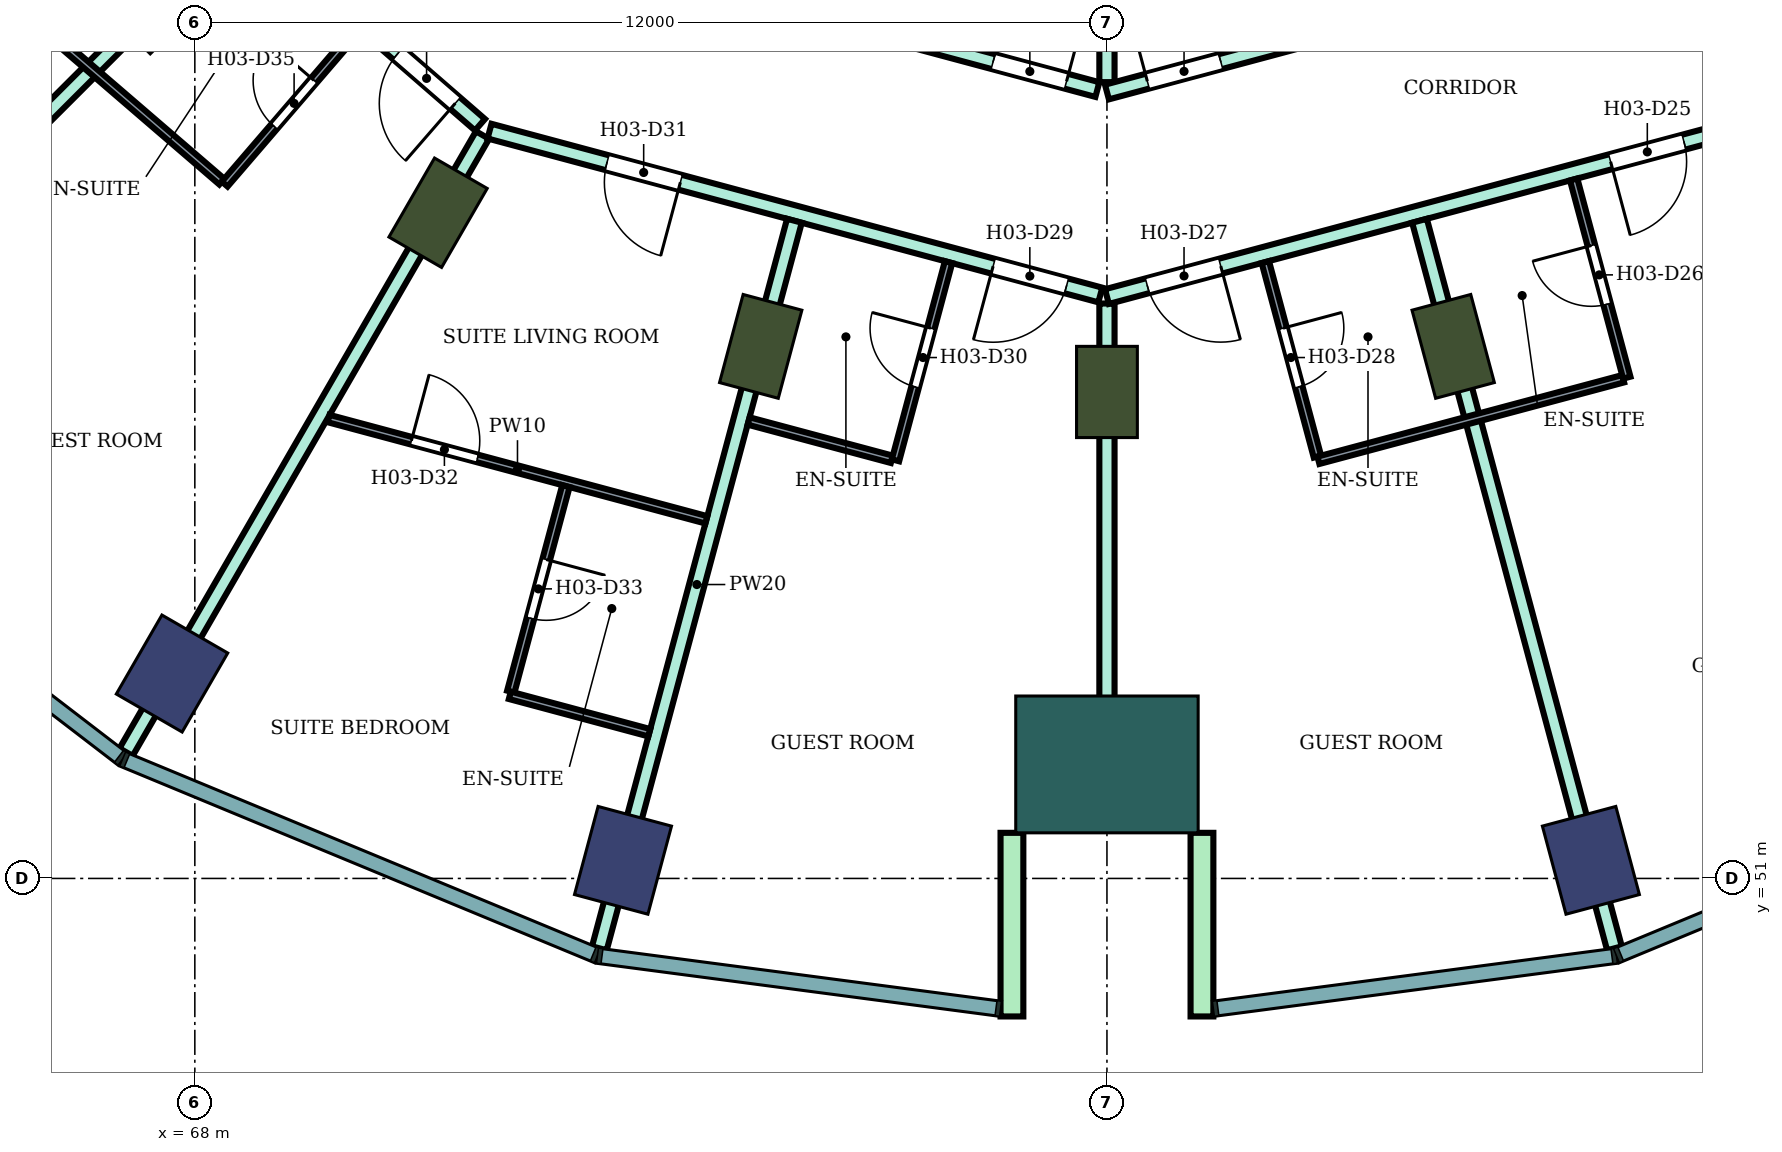
"""IFC4 building model, lengths in metres.
Left out: names, types, materials, properties, quantities, classifications, styles, units other than length and angle.
Written with IfcOpenShell. Run it as: python <this file> out.ifc"""

import sys

from ifc_helpers import new_model, si_unit, direction, frame, frame_2d, origin, origin_2d, place, context, subcontext, project, spatial, rectangle, extrude, element, fill, save


model = new_model("IFC4")
c1 = context("Model", 3, precision=1e-05, world=origin(), true_north=direction((0.0, 1.0)))
c2 = subcontext(c1, "Body", "Model", "MODEL_VIEW")
j1 = project(units=[si_unit("LENGTHUNIT", "METRE"), si_unit("PLANEANGLEUNIT", "RADIAN")], contexts=[c1])
p1 = place(None, origin())
s1 = spatial("IfcSite", under=j1, at=p1, CompositionType="ELEMENT")
p2 = place(p1, origin())
s2 = spatial("IfcBuilding", under=s1, at=p2, CompositionType="ELEMENT")
p3 = place(p2, frame((0.0, 0.0, 51.6)))
s3 = spatial("IfcBuildingStorey", under=s2, at=p3, CompositionType="ELEMENT", Elevation=51.6)
for number, where, z_axis, x_axis in (
    (1, (67.7, 53.696, 0.0), (0.0, 0.0, 1.0), (-0.5, -0.866, 0.0)),
    (2, (73.633, 51.238, 0.0), (0.0, 0.0, 1.0), (-0.259, -0.966, 0.0)),
    (3, (86.367, 51.238, 0.0), (0.0, 0.0, 1.0), (0.259, -0.966, 0.0)),
):
    element("IfcColumn", number, at=place(p3, frame(where, z_axis=z_axis, x_axis=x_axis)), inside=s3, PredefinedType="COLUMN", context=c2, shape_type="SweptSolid", body=[
        extrude(rectangle(XDim=1.2, YDim=1.0, at=origin_2d()), origin(), (0.0, 0.0, 1.0), 3.8),
    ])
for number, where, z_axis, x_axis in (
    (4, (67.555, 62.555, 0.0), (0.0, 0.0, 1.0), (-0.707, -0.707, 0.0)),
    (5, (71.2, 59.758, 0.0), (0.0, 0.0, 1.0), (-0.5, -0.866, 0.0)),
    (6, (75.445, 58.0, 0.0), (0.0, 0.0, 1.0), (-0.259, -0.966, 0.0)),
    (7, (80.0, 57.4, 0.0), (0.0, 0.0, 1.0), (0.0, -1.0, 0.0)),
    (8, (84.555, 58.0, 0.0), (0.0, 0.0, 1.0), (0.259, -0.966, 0.0)),
):
    element("IfcColumn", number, at=place(p3, frame(where, z_axis=z_axis, x_axis=x_axis)), inside=s3, PredefinedType="COLUMN", context=c2, shape_type="SweptSolid", body=[
        extrude(rectangle(XDim=1.2, YDim=0.8, at=origin_2d()), origin(), (0.0, 0.0, 1.0), 3.8),
    ])
p4 = place(p3, frame((80.0, 52.5, 0.0), z_axis=(0.0, 0.0, 1.0), x_axis=(0.0, -1.0, 0.0)))
e9 = element("IfcColumn", 9, at=p4, inside=s3, PredefinedType="COLUMN", context=c2, shape_type="SweptSolid", body=[
    extrude(rectangle(XDim=1.8, YDim=2.4, at=origin_2d()), origin(), (0.0, 0.0, 1.0), 3.8),
])
for number, where, z_axis, x_axis in (
    (10, (78.75, 51.6, 0.0), (0.0, 0.0, 1.0), (0.0, -1.0, 0.0)),
    (11, (81.25, 51.6, 0.0), (0.0, 0.0, 1.0), (0.0, -1.0, 0.0)),
):
    element("IfcWall", number, at=place(p3, frame(where, z_axis=z_axis, x_axis=x_axis)), inside=s3, PredefinedType="NOTDEFINED", context=c2, shape_type="SweptSolid", body=[
        extrude(rectangle(XDim=2.416, YDim=0.3, at=frame_2d((1.208, 0.0))), origin(), (0.0, 0.0, 1.0), 3.8),
    ])
p5 = place(p3, frame((63.596, 58.596, 0.0), z_axis=(0.0, 0.0, 1.0), x_axis=(0.707106781187, 0.707106781187, 0.0)))
e12 = element("IfcWall", 12, at=p5, inside=s3, PredefinedType="PARTITIONING", context=c2, shape_type="SweptSolid", body=[
    extrude(rectangle(XDim=7.005, YDim=0.2, at=frame_2d((3.503, 0.0))), origin(), (0.0, 0.0, 1.0), 3.35),
])
p6 = place(p3, frame((67.081, 64.971, 0.0), z_axis=(0.0, 0.0, 1.0), x_axis=(0.755031061605, -0.65568902386, 0.0)))
e13 = element("IfcWall", 13, at=p6, inside=s3, PredefinedType="PARTITIONING", context=c2, shape_type="SweptSolid", body=[
    extrude(rectangle(XDim=6.186, YDim=0.2, at=frame_2d((3.093, 0.0))), origin(), (0.0, 0.0, 1.0), 3.35),
])
p7 = place(p6, frame((4.755, 0.0, 0.0)))
e14 = element("IfcOpeningElement", 14, at=p7, cuts=e13, PredefinedType="OPENING", context=c2, shape_type="SweptSolid", body=[
    extrude(rectangle(XDim=1.0, YDim=2.1, at=frame_2d((0.5, 1.05))), frame((0.0, 0.11, 0.0), z_axis=(0.0, -1.0, 0.0), x_axis=(1.0, 0.0, 0.0)), (0.0, 0.0, 1.0), 0.22),
])
p8 = place(p3, frame((67.095, 52.662, 0.0), z_axis=(0.0, 0.0, 1.0), x_axis=(0.500247659952, 0.865882370021, 0.0)))
e15 = element("IfcWall", 15, at=p8, inside=s3, PredefinedType="PARTITIONING", context=c2, shape_type="SweptSolid", body=[
    extrude(rectangle(XDim=9.375, YDim=0.2, at=frame_2d((4.688, 0.0))), origin(), (0.0, 0.0, 1.0), 3.35),
])
p9 = place(p3, frame((71.877, 60.831, 0.0), z_axis=(0.0, 0.0, 1.0), x_axis=(0.965852509869, -0.259092510851, 0.0)))
e16 = element("IfcWall", 16, at=p9, inside=s3, PredefinedType="PARTITIONING", context=c2, shape_type="SweptSolid", body=[
    extrude(rectangle(XDim=8.32, YDim=0.2, at=frame_2d((4.16, 0.0))), origin(), (0.0, 0.0, 1.0), 3.35),
])
p10 = place(p9, frame((6.86, 0.0, 0.0)))
e17 = element("IfcOpeningElement", 17, at=p10, cuts=e16, PredefinedType="OPENING", context=c2, shape_type="SweptSolid", body=[
    extrude(rectangle(XDim=1.0, YDim=2.1, at=frame_2d((0.5, 1.05))), frame((0.0, 0.11, 0.0), z_axis=(0.0, -1.0, 0.0), x_axis=(1.0, 0.0, 0.0)), (0.0, 0.0, 1.0), 0.22),
])
p11 = place(p9, frame((1.6, 0.0, 0.0)))
e18 = element("IfcOpeningElement", 18, at=p11, cuts=e16, PredefinedType="OPENING", context=c2, shape_type="SweptSolid", body=[
    extrude(rectangle(XDim=1.0, YDim=2.1, at=frame_2d((0.5, 1.05))), frame((0.0, 0.11, 0.0), z_axis=(0.0, -1.0, 0.0), x_axis=(1.0, 0.0, 0.0)), (0.0, 0.0, 1.0), 0.22),
])
p12 = place(p3, frame((73.297, 63.143, 0.0), z_axis=(0.0, 0.0, 1.0), x_axis=(0.965859030528, -0.25906820173, 0.0)))
e19 = element("IfcWall", 19, at=p12, inside=s3, PredefinedType="PARTITIONING", context=c2, shape_type="SweptSolid", body=[
    extrude(rectangle(XDim=6.81, YDim=0.2, at=frame_2d((3.405, 0.0))), origin(), (0.0, 0.0, 1.0), 3.35),
])
p13 = place(p12, frame((5.39, 0.0, 0.0)))
e20 = element("IfcOpeningElement", 20, at=p13, cuts=e19, PredefinedType="OPENING", context=c2, shape_type="SweptSolid", body=[
    extrude(rectangle(XDim=1.0, YDim=2.1, at=frame_2d((0.5, 1.05))), frame((0.0, 0.11, 0.0), z_axis=(0.0, -1.0, 0.0), x_axis=(1.0, 0.0, 0.0)), (0.0, 0.0, 1.0), 0.22),
])
p14 = place(p3, frame((73.322, 50.081, 0.0), z_axis=(0.0, 0.0, 1.0), x_axis=(0.25896431718, 0.965886889044, 0.0)))
e21 = element("IfcWall", 21, at=p14, inside=s3, PredefinedType="PARTITIONING", context=c2, shape_type="SweptSolid", body=[
    extrude(rectangle(XDim=9.909, YDim=0.2, at=frame_2d((4.955, 0.0))), origin(), (0.0, 0.0, 1.0), 3.35),
])
p15 = place(p3, frame((80.0, 51.8, 0.0), z_axis=(0.0, 0.0, 1.0), x_axis=(0.0, 1.0, 0.0)))
e22 = element("IfcWall", 22, at=p15, inside=s3, PredefinedType="PARTITIONING", context=c2, shape_type="SweptSolid", body=[
    extrude(rectangle(XDim=6.764, YDim=0.2, at=frame_2d((3.382, 0.0))), origin(), (0.0, 0.0, 1.0), 3.35),
])
p16 = place(p3, frame((80.0, 58.655, 0.0), z_axis=(0.0, 0.0, 1.0), x_axis=(0.965974635626, 0.258636817424, 0.0)))
e23 = element("IfcWall", 23, at=p16, inside=s3, PredefinedType="PARTITIONING", context=c2, shape_type="SweptSolid", body=[
    extrude(rectangle(XDim=8.36, YDim=0.2, at=frame_2d((4.18, 0.0))), origin(), (0.0, 0.0, 1.0), 3.35),
])
p17 = place(p16, frame((6.86, 0.0, 0.0)))
e24 = element("IfcOpeningElement", 24, at=p17, cuts=e23, PredefinedType="OPENING", context=c2, shape_type="SweptSolid", body=[
    extrude(rectangle(XDim=1.0, YDim=2.1, at=frame_2d((0.5, 1.05))), frame((0.0, 0.11, 0.0), z_axis=(0.0, -1.0, 0.0), x_axis=(1.0, 0.0, 0.0)), (0.0, 0.0, 1.0), 0.22),
])
p18 = place(p16, frame((0.55, 0.0, 0.0)))
e25 = element("IfcOpeningElement", 25, at=p18, cuts=e23, PredefinedType="OPENING", context=c2, shape_type="SweptSolid", body=[
    extrude(rectangle(XDim=1.0, YDim=2.1, at=frame_2d((0.5, 1.05))), frame((0.0, 0.11, 0.0), z_axis=(0.0, -1.0, 0.0), x_axis=(1.0, 0.0, 0.0)), (0.0, 0.0, 1.0), 0.22),
])
p19 = place(p3, frame((80.0, 61.476, 0.0), z_axis=(0.0, 0.0, 1.0), x_axis=(0.0, 1.0, 0.0)))
e26 = element("IfcWall", 26, at=p19, inside=s3, PredefinedType="PARTITIONING", context=c2, shape_type="SweptSolid", body=[
    extrude(rectangle(XDim=5.825, YDim=0.2, at=frame_2d((2.913, 0.0))), origin(), (0.0, 0.0, 1.0), 3.35),
])
p20 = place(p3, frame((80.0, 61.346, 0.0), z_axis=(0.0, 0.0, 1.0), x_axis=(0.965924181808, 0.258825182312, 0.0)))
e27 = element("IfcWall", 27, at=p20, inside=s3, PredefinedType="PARTITIONING", context=c2, shape_type="SweptSolid", body=[
    extrude(rectangle(XDim=6.94, YDim=0.2, at=frame_2d((3.47, 0.0))), origin(), (0.0, 0.0, 1.0), 3.35),
])
p21 = place(p20, frame((0.55, 0.0, 0.0)))
e28 = element("IfcOpeningElement", 28, at=p21, cuts=e27, PredefinedType="OPENING", context=c2, shape_type="SweptSolid", body=[
    extrude(rectangle(XDim=1.0, YDim=2.1, at=frame_2d((0.5, 1.05))), frame((0.0, 0.11, 0.0), z_axis=(0.0, -1.0, 0.0), x_axis=(1.0, 0.0, 0.0)), (0.0, 0.0, 1.0), 0.22),
])
p22 = place(p3, frame((84.112, 59.652, 0.0), z_axis=(0.0, 0.0, 1.0), x_axis=(0.258843225553, -0.965919346832, 0.0)))
e29 = element("IfcWall", 29, at=p22, inside=s3, PredefinedType="PARTITIONING", context=c2, shape_type="SweptSolid", body=[
    extrude(rectangle(XDim=9.909, YDim=0.2, at=frame_2d((4.955, 0.0))), origin(), (0.0, 0.0, 1.0), 3.35),
])
p23 = place(p3, frame((65.209, 62.875, 0.0), z_axis=(0.0, 0.0, 1.0), x_axis=(0.757930378138, -0.652335451969, 0.0)))
e30 = element("IfcWall", 30, at=p23, inside=s3, PredefinedType="PARTITIONING", context=c2, shape_type="SweptSolid", body=[
    extrude(rectangle(XDim=4.15, YDim=0.1, at=frame_2d((2.075, 0.0))), origin(), (0.0, 0.0, 1.0), 3.35),
])
p24 = place(p3, frame((68.393, 60.135, 0.0), z_axis=(0.0, 0.0, 1.0), x_axis=(0.652061182569, 0.758166349944, 0.0)))
e31 = element("IfcWall", 31, at=p24, inside=s3, PredefinedType="PARTITIONING", context=c2, shape_type="SweptSolid", body=[
    extrude(rectangle(XDim=2.69, YDim=0.1, at=frame_2d((1.345, 0.0))), origin(), (0.0, 0.0, 1.0), 3.35),
])
p25 = place(p24, frame((1.0, 0.0, 0.0)))
e32 = element("IfcOpeningElement", 32, at=p25, cuts=e31, PredefinedType="OPENING", context=c2, shape_type="SweptSolid", body=[
    extrude(rectangle(XDim=0.8, YDim=2.1, at=frame_2d((0.4, 1.05))), frame((0.0, 0.06, 0.0), z_axis=(0.0, -1.0, 0.0), x_axis=(1.0, 0.0, 0.0)), (0.0, 0.0, 1.0), 0.12),
])
p26 = place(p3, frame((69.76, 57.051, 0.0), z_axis=(0.0, 0.0, 1.0), x_axis=(0.965880475586, -0.258988236958, 0.0)))
e33 = element("IfcWall", 33, at=p26, inside=s3, PredefinedType="PARTITIONING", context=c2, shape_type="SweptSolid", body=[
    extrude(rectangle(XDim=5.146, YDim=0.1, at=frame_2d((2.573, 0.0))), origin(), (0.0, 0.0, 1.0), 3.35),
])
p27 = place(p26, frame((1.128, 0.0, 0.0)))
e34 = element("IfcOpeningElement", 34, at=p27, cuts=e33, PredefinedType="OPENING", context=c2, shape_type="SweptSolid", body=[
    extrude(rectangle(XDim=0.9, YDim=2.1, at=frame_2d((0.45, 1.05))), frame((0.0, 0.06, 0.0), z_axis=(0.0, -1.0, 0.0), x_axis=(1.0, 0.0, 0.0)), (0.0, 0.0, 1.0), 0.12),
])
p28 = place(p3, frame((72.157, 53.457, 0.0), z_axis=(0.0, 0.0, 1.0), x_axis=(0.258975798317, 0.965883810759, 0.0)))
e35 = element("IfcWall", 35, at=p28, inside=s3, PredefinedType="PARTITIONING", context=c2, shape_type="SweptSolid", body=[
    extrude(rectangle(XDim=2.8, YDim=0.1, at=frame_2d((1.4, 0.0))), origin(), (0.0, 0.0, 1.0), 3.35),
])
p29 = place(p28, frame((1.0, 0.0, 0.0)))
e36 = element("IfcOpeningElement", 36, at=p29, cuts=e35, PredefinedType="OPENING", context=c2, shape_type="SweptSolid", body=[
    extrude(rectangle(XDim=0.8, YDim=2.1, at=frame_2d((0.4, 1.05))), frame((0.0, 0.06, 0.0), z_axis=(0.0, -1.0, 0.0), x_axis=(1.0, 0.0, 0.0)), (0.0, 0.0, 1.0), 0.12),
])
p30 = place(p3, frame((72.144, 53.409, 0.0), z_axis=(0.0, 0.0, 1.0), x_axis=(0.965907902023, -0.258885930111, 0.0)))
e37 = element("IfcWall", 37, at=p30, inside=s3, PredefinedType="PARTITIONING", context=c2, shape_type="SweptSolid", body=[
    extrude(rectangle(XDim=1.9, YDim=0.1, at=frame_2d((0.95, 0.0))), origin(), (0.0, 0.0, 1.0), 3.35),
])
p31 = place(p3, frame((75.286, 57.018, 0.0), z_axis=(0.0, 0.0, 1.0), x_axis=(0.966003902934, -0.258527483095, 0.0)))
e38 = element("IfcWall", 38, at=p31, inside=s3, PredefinedType="PARTITIONING", context=c2, shape_type="SweptSolid", body=[
    extrude(rectangle(XDim=1.95, YDim=0.1, at=frame_2d((0.975, 0.0))), origin(), (0.0, 0.0, 1.0), 3.35),
])
p32 = place(p3, frame((77.218, 56.501, 0.0), z_axis=(0.0, 0.0, 1.0), x_axis=(0.258591408257, 0.965986792651, 0.0)))
e39 = element("IfcWall", 39, at=p32, inside=s3, PredefinedType="PARTITIONING", context=c2, shape_type="SweptSolid", body=[
    extrude(rectangle(XDim=2.699, YDim=0.1, at=frame_2d((1.35, 0.0))), origin(), (0.0, 0.0, 1.0), 3.35),
])
p33 = place(p32, frame((1.0, 0.0, 0.0)))
e40 = element("IfcOpeningElement", 40, at=p33, cuts=e39, PredefinedType="OPENING", context=c2, shape_type="SweptSolid", body=[
    extrude(rectangle(XDim=0.8, YDim=2.1, at=frame_2d((0.4, 1.05))), frame((0.0, 0.06, 0.0), z_axis=(0.0, -1.0, 0.0), x_axis=(1.0, 0.0, 0.0)), (0.0, 0.0, 1.0), 0.12),
])
p34 = place(p3, frame((82.084, 59.108, 0.0), z_axis=(0.0, 0.0, 1.0), x_axis=(0.258591746437, -0.965986702121, 0.0)))
e41 = element("IfcWall", 41, at=p34, inside=s3, PredefinedType="PARTITIONING", context=c2, shape_type="SweptSolid", body=[
    extrude(rectangle(XDim=2.649, YDim=0.1, at=frame_2d((1.325, 0.0))), origin(), (0.0, 0.0, 1.0), 3.35),
])
p35 = place(p34, frame((0.9, 0.0, 0.0)))
e42 = element("IfcOpeningElement", 42, at=p35, cuts=e41, PredefinedType="OPENING", context=c2, shape_type="SweptSolid", body=[
    extrude(rectangle(XDim=0.8, YDim=2.1, at=frame_2d((0.4, 1.05))), frame((0.0, 0.06, 0.0), z_axis=(0.0, -1.0, 0.0), x_axis=(1.0, 0.0, 0.0)), (0.0, 0.0, 1.0), 0.12),
])
p36 = place(p3, frame((82.782, 56.501, 0.0), z_axis=(0.0, 0.0, 1.0), x_axis=(0.965999228418, 0.258544949083, 0.0)))
e43 = element("IfcWall", 43, at=p36, inside=s3, PredefinedType="PARTITIONING", context=c2, shape_type="SweptSolid", body=[
    extrude(rectangle(XDim=4.15, YDim=0.1, at=frame_2d((2.075, 0.0))), origin(), (0.0, 0.0, 1.0), 3.35),
])
p37 = place(p3, frame((86.14, 60.196, 0.0), z_axis=(0.0, 0.0, 1.0), x_axis=(0.258945475746, -0.965891940432, 0.0)))
e44 = element("IfcWall", 44, at=p37, inside=s3, PredefinedType="PARTITIONING", context=c2, shape_type="SweptSolid", body=[
    extrude(rectangle(XDim=2.7, YDim=0.1, at=frame_2d((1.35, 0.0))), origin(), (0.0, 0.0, 1.0), 3.35),
])
p38 = place(p37, frame((0.9, 0.0, 0.0)))
e45 = element("IfcOpeningElement", 45, at=p38, cuts=e44, PredefinedType="OPENING", context=c2, shape_type="SweptSolid", body=[
    extrude(rectangle(XDim=0.8, YDim=2.1, at=frame_2d((0.4, 1.05))), frame((0.0, 0.06, 0.0), z_axis=(0.0, -1.0, 0.0), x_axis=(1.0, 0.0, 0.0)), (0.0, 0.0, 1.0), 0.12),
])
p39 = place(p17, frame((1.0, 0.0, 0.0), z_axis=(0.0, 0.0, 1.0), x_axis=(-1.0, 0.0, 0.0)))
e46 = element("IfcDoor", 46, at=p39, inside=s3, OperationType="SINGLE_SWING_RIGHT", PredefinedType="DOOR", context=c2, shape_type="SweptSolid", body=[
    extrude(rectangle(XDim=1.0, YDim=2.1, at=frame_2d((0.5, 1.05))), frame((0.0, 0.025, 0.0), z_axis=(0.0, -1.0, 0.0), x_axis=(1.0, 0.0, 0.0)), (0.0, 0.0, 1.0), 0.05),
])
fill(e24, e46)
p40 = place(p38, frame((0.8, 0.0, 0.0), z_axis=(0.0, 0.0, 1.0), x_axis=(-1.0, 0.0, 0.0)))
e47 = element("IfcDoor", 47, at=p40, inside=s3, OperationType="SINGLE_SWING_RIGHT", PredefinedType="DOOR", context=c2, shape_type="SweptSolid", body=[
    extrude(rectangle(XDim=0.8, YDim=2.1, at=frame_2d((0.4, 1.05))), frame((0.0, 0.025, 0.0), z_axis=(0.0, -1.0, 0.0), x_axis=(1.0, 0.0, 0.0)), (0.0, 0.0, 1.0), 0.05),
])
fill(e45, e47)
p41 = place(p18, frame((1.0, 0.0, 0.0), z_axis=(0.0, 0.0, 1.0), x_axis=(-1.0, 0.0, 0.0)))
e48 = element("IfcDoor", 48, at=p41, inside=s3, OperationType="SINGLE_SWING_LEFT", PredefinedType="DOOR", context=c2, shape_type="SweptSolid", body=[
    extrude(rectangle(XDim=1.0, YDim=2.1, at=frame_2d((0.5, 1.05))), frame((0.0, 0.025, 0.0), z_axis=(0.0, -1.0, 0.0), x_axis=(1.0, 0.0, 0.0)), (0.0, 0.0, 1.0), 0.05),
])
fill(e25, e48)
p42 = place(p35, origin())
e49 = element("IfcDoor", 49, at=p42, inside=s3, OperationType="SINGLE_SWING_LEFT", PredefinedType="DOOR", context=c2, shape_type="SweptSolid", body=[
    extrude(rectangle(XDim=0.8, YDim=2.1, at=frame_2d((0.4, 1.05))), frame((0.0, 0.025, 0.0), z_axis=(0.0, -1.0, 0.0), x_axis=(1.0, 0.0, 0.0)), (0.0, 0.0, 1.0), 0.05),
])
fill(e42, e49)
p43 = place(p10, frame((1.0, 0.0, 0.0), z_axis=(0.0, 0.0, 1.0), x_axis=(-1.0, 0.0, 0.0)))
e50 = element("IfcDoor", 50, at=p43, inside=s3, OperationType="SINGLE_SWING_RIGHT", PredefinedType="DOOR", context=c2, shape_type="SweptSolid", body=[
    extrude(rectangle(XDim=1.0, YDim=2.1, at=frame_2d((0.5, 1.05))), frame((0.0, 0.025, 0.0), z_axis=(0.0, -1.0, 0.0), x_axis=(1.0, 0.0, 0.0)), (0.0, 0.0, 1.0), 0.05),
])
fill(e17, e50)
p44 = place(p33, origin())
e51 = element("IfcDoor", 51, at=p44, inside=s3, OperationType="SINGLE_SWING_RIGHT", PredefinedType="DOOR", context=c2, shape_type="SweptSolid", body=[
    extrude(rectangle(XDim=0.8, YDim=2.1, at=frame_2d((0.4, 1.05))), frame((0.0, 0.025, 0.0), z_axis=(0.0, -1.0, 0.0), x_axis=(1.0, 0.0, 0.0)), (0.0, 0.0, 1.0), 0.05),
])
fill(e40, e51)
p45 = place(p11, frame((1.0, 0.0, 0.0), z_axis=(0.0, 0.0, 1.0), x_axis=(-1.0, 0.0, 0.0)))
e52 = element("IfcDoor", 52, at=p45, inside=s3, OperationType="SINGLE_SWING_LEFT", PredefinedType="DOOR", context=c2, shape_type="SweptSolid", body=[
    extrude(rectangle(XDim=1.0, YDim=2.1, at=frame_2d((0.5, 1.05))), frame((0.0, 0.025, 0.0), z_axis=(0.0, -1.0, 0.0), x_axis=(1.0, 0.0, 0.0)), (0.0, 0.0, 1.0), 0.05),
])
fill(e18, e52)
p46 = place(p27, origin())
e53 = element("IfcDoor", 53, at=p46, inside=s3, OperationType="SINGLE_SWING_LEFT", PredefinedType="DOOR", context=c2, shape_type="SweptSolid", body=[
    extrude(rectangle(XDim=0.9, YDim=2.1, at=frame_2d((0.45, 1.05))), frame((0.0, 0.025, 0.0), z_axis=(0.0, -1.0, 0.0), x_axis=(1.0, 0.0, 0.0)), (0.0, 0.0, 1.0), 0.05),
])
fill(e34, e53)
p47 = place(p29, frame((0.8, 0.0, 0.0), z_axis=(0.0, 0.0, 1.0), x_axis=(-1.0, 0.0, 0.0)))
e54 = element("IfcDoor", 54, at=p47, inside=s3, OperationType="SINGLE_SWING_LEFT", PredefinedType="DOOR", context=c2, shape_type="SweptSolid", body=[
    extrude(rectangle(XDim=0.8, YDim=2.1, at=frame_2d((0.4, 1.05))), frame((0.0, 0.025, 0.0), z_axis=(0.0, -1.0, 0.0), x_axis=(1.0, 0.0, 0.0)), (0.0, 0.0, 1.0), 0.05),
])
fill(e36, e54)
p48 = place(p7, frame((1.0, 0.0, 0.0), z_axis=(0.0, 0.0, 1.0), x_axis=(-1.0, 0.0, 0.0)))
e55 = element("IfcDoor", 55, at=p48, inside=s3, OperationType="SINGLE_SWING_LEFT", PredefinedType="DOOR", context=c2, shape_type="SweptSolid", body=[
    extrude(rectangle(XDim=1.0, YDim=2.1, at=frame_2d((0.5, 1.05))), frame((0.0, 0.025, 0.0), z_axis=(0.0, -1.0, 0.0), x_axis=(1.0, 0.0, 0.0)), (0.0, 0.0, 1.0), 0.05),
])
fill(e14, e55)
p49 = place(p25, origin())
e56 = element("IfcDoor", 56, at=p49, inside=s3, OperationType="SINGLE_SWING_RIGHT", PredefinedType="DOOR", context=c2, shape_type="SweptSolid", body=[
    extrude(rectangle(XDim=0.8, YDim=2.1, at=frame_2d((0.4, 1.05))), frame((0.0, 0.025, 0.0), z_axis=(0.0, -1.0, 0.0), x_axis=(1.0, 0.0, 0.0)), (0.0, 0.0, 1.0), 0.05),
])
fill(e32, e56)
p50 = place(p21, origin())
e57 = element("IfcDoor", 57, at=p50, inside=s3, OperationType="SINGLE_SWING_LEFT", PredefinedType="DOOR", context=c2, shape_type="SweptSolid", body=[
    extrude(rectangle(XDim=1.0, YDim=2.1, at=frame_2d((0.5, 1.05))), frame((0.0, 0.025, 0.0), z_axis=(0.0, -1.0, 0.0), x_axis=(1.0, 0.0, 0.0)), (0.0, 0.0, 1.0), 0.05),
])
fill(e28, e57)
p51 = place(p13, origin())
e58 = element("IfcDoor", 58, at=p51, inside=s3, OperationType="SINGLE_SWING_RIGHT", PredefinedType="DOOR", context=c2, shape_type="SweptSolid", body=[
    extrude(rectangle(XDim=1.0, YDim=2.1, at=frame_2d((0.5, 1.05))), frame((0.0, 0.025, 0.0), z_axis=(0.0, -1.0, 0.0), x_axis=(1.0, 0.0, 0.0)), (0.0, 0.0, 1.0), 0.05),
])
fill(e20, e58)
save(model, sys.argv[1])
